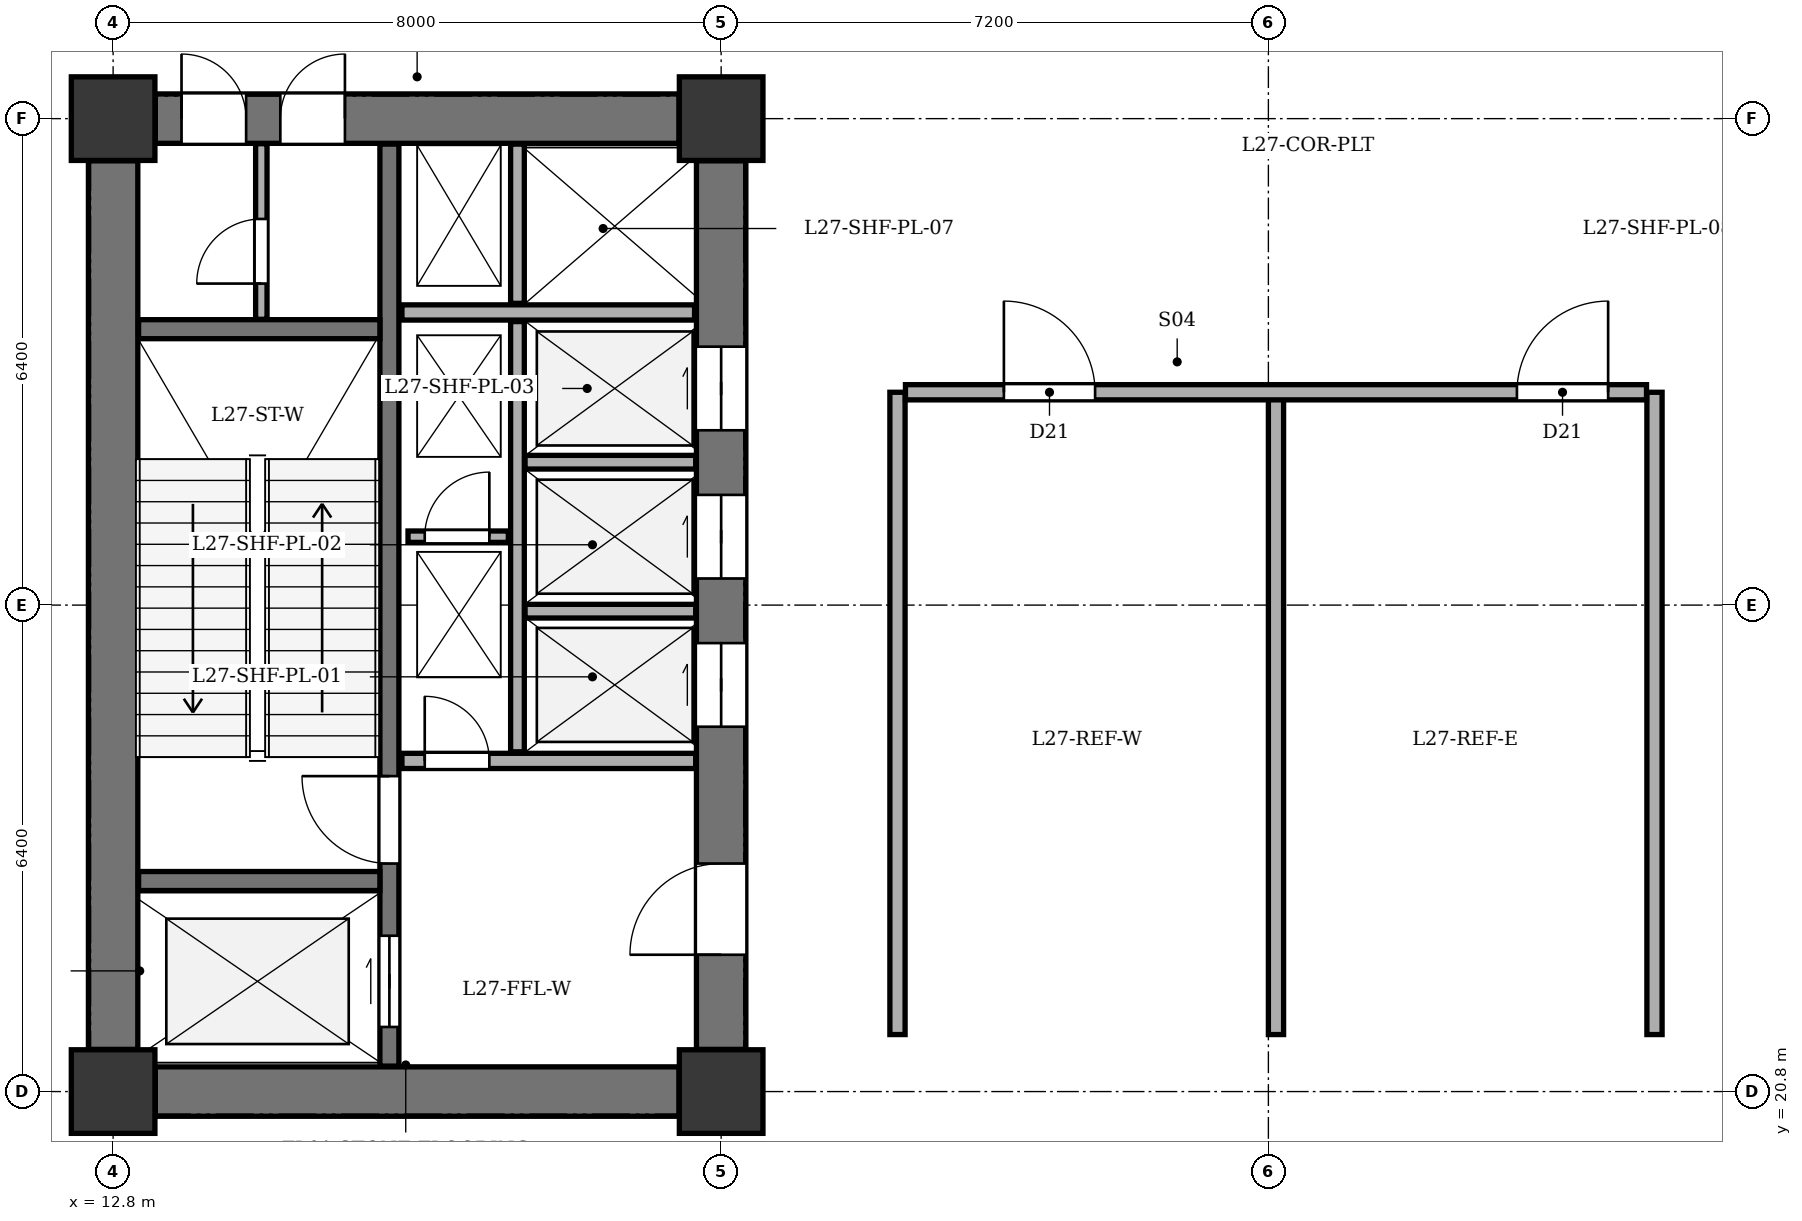
"""IFC4 building model, lengths in metres.
Left out: names, types, materials, properties, quantities, classifications, styles, units other than length and angle.
Written with IfcOpenShell. Run it as: python <this file> out.ifc"""

import sys

from ifc_helpers import new_model, si_unit, direction, frame, frame_2d, origin, origin_2d, place, context, subcontext, project, spatial, rectangle, extrude, element, fill, save


model = new_model("IFC4")
c1 = context("Model", 3, precision=1e-05, world=origin(), true_north=direction((0.0, 1.0)))
c2 = subcontext(c1, "Body", "Model", "MODEL_VIEW")
j1 = project(units=[si_unit("LENGTHUNIT", "METRE"), si_unit("PLANEANGLEUNIT", "RADIAN")], contexts=[c1])
p1 = place(None, origin())
s1 = spatial("IfcSite", under=j1, at=p1, CompositionType="ELEMENT")
p2 = place(p1, origin())
s2 = spatial("IfcBuilding", under=s1, at=p2, CompositionType="ELEMENT")
p3 = place(p2, frame((0.0, 0.0, 110.1)))
s3 = spatial("IfcBuildingStorey", under=s2, at=p3, CompositionType="ELEMENT", Elevation=110.1)
for number, where, z_axis, x_axis in (
    (1, (12.8, 20.8, 0.0), (0.0, 0.0, 1.0), (1.0, 0.0, 0.0)),
    (2, (20.8, 20.8, 0.0), (0.0, 0.0, 1.0), (1.0, 0.0, 0.0)),
    (3, (12.8, 33.6, 0.0), (0.0, 0.0, 1.0), (1.0, 0.0, 0.0)),
    (4, (20.8, 33.6, 0.0), (0.0, 0.0, 1.0), (1.0, 0.0, 0.0)),
):
    element("IfcColumn", number, at=place(p3, frame(where, z_axis=z_axis, x_axis=x_axis)), inside=s3, PredefinedType="COLUMN", context=c2, shape_type="SweptSolid", body=[
        extrude(rectangle(XDim=1.1, YDim=1.1, at=origin_2d()), origin(), (0.0, 0.0, 1.0), 5.4),
    ])
p4 = place(p3, frame((12.8, 21.355, 0.0), z_axis=(0.0, 0.0, 1.0), x_axis=(0.0, 1.0, 0.0)))
e5 = element("IfcWall", 5, at=p4, inside=s3, PredefinedType="SHEAR", context=c2, shape_type="SweptSolid", body=[
    extrude(rectangle(XDim=11.69, YDim=0.65, at=frame_2d((5.845, 0.0))), origin(), (0.0, 0.0, 1.0), 5.04),
])
p5 = place(p3, frame((13.355, 20.8, 0.0), z_axis=(0.0, 0.0, 1.0), x_axis=(1.0, 0.0, 0.0)))
e6 = element("IfcWall", 6, at=p5, inside=s3, PredefinedType="SHEAR", context=c2, shape_type="SweptSolid", body=[
    extrude(rectangle(XDim=6.89, YDim=0.65, at=frame_2d((3.445, 0.0))), origin(), (0.0, 0.0, 1.0), 5.04),
])
p6 = place(p3, frame((13.355, 33.6, 0.0), z_axis=(0.0, 0.0, 1.0), x_axis=(1.0, 0.0, 0.0)))
e7 = element("IfcWall", 7, at=p6, inside=s3, PredefinedType="SHEAR", context=c2, shape_type="SweptSolid", body=[
    extrude(rectangle(XDim=6.89, YDim=0.65, at=frame_2d((3.445, 0.0))), origin(), (0.0, 0.0, 1.0), 5.04),
])
p7 = place(p6, frame((0.345, 0.0, 0.0)))
e8 = element("IfcOpeningElement", 8, at=p7, cuts=e7, PredefinedType="OPENING", context=c2, shape_type="SweptSolid", body=[
    extrude(rectangle(XDim=0.85, YDim=2.02, at=frame_2d((0.425, 1.01))), frame((0.0, 0.335, 0.0), z_axis=(0.0, -1.0, 0.0), x_axis=(1.0, 0.0, 0.0)), (0.0, 0.0, 1.0), 0.67),
])
p8 = place(p6, frame((1.645, 0.0, 0.0)))
e9 = element("IfcOpeningElement", 9, at=p8, cuts=e7, PredefinedType="OPENING", context=c2, shape_type="SweptSolid", body=[
    extrude(rectangle(XDim=0.85, YDim=2.02, at=frame_2d((0.425, 1.01))), frame((0.0, 0.335, 0.0), z_axis=(0.0, -1.0, 0.0), x_axis=(1.0, 0.0, 0.0)), (0.0, 0.0, 1.0), 0.67),
])
p9 = place(p3, frame((20.8, 21.355, 0.0), z_axis=(0.0, 0.0, 1.0), x_axis=(0.0, 1.0, 0.0)))
e10 = element("IfcWall", 10, at=p9, inside=s3, PredefinedType="SHEAR", context=c2, shape_type="SweptSolid", body=[
    extrude(rectangle(XDim=11.69, YDim=0.65, at=frame_2d((5.845, 0.0))), origin(), (0.0, 0.0, 1.0), 5.04),
])
p10 = place(p9, frame((1.245, 0.0, 0.0)))
e11 = element("IfcOpeningElement", 11, at=p10, cuts=e10, PredefinedType="OPENING", context=c2, shape_type="SweptSolid", body=[
    extrude(rectangle(XDim=1.2, YDim=2.15, at=frame_2d((0.6, 1.075))), frame((0.0, 0.335, 0.0), z_axis=(0.0, -1.0, 0.0), x_axis=(1.0, 0.0, 0.0)), (0.0, 0.0, 1.0), 0.67),
])
p11 = place(p9, frame((4.245, 0.0, 0.0)))
e12 = element("IfcOpeningElement", 12, at=p11, cuts=e10, PredefinedType="OPENING", context=c2, shape_type="SweptSolid", body=[
    extrude(rectangle(XDim=1.1, YDim=2.1, at=frame_2d((0.55, 1.05))), frame((0.0, 0.335, 0.0), z_axis=(0.0, -1.0, 0.0), x_axis=(1.0, 0.0, 0.0)), (0.0, 0.0, 1.0), 0.67),
])
p12 = place(p9, frame((6.195, 0.0, 0.0)))
e13 = element("IfcOpeningElement", 13, at=p12, cuts=e10, PredefinedType="OPENING", context=c2, shape_type="SweptSolid", body=[
    extrude(rectangle(XDim=1.1, YDim=2.1, at=frame_2d((0.55, 1.05))), frame((0.0, 0.335, 0.0), z_axis=(0.0, -1.0, 0.0), x_axis=(1.0, 0.0, 0.0)), (0.0, 0.0, 1.0), 0.67),
])
p13 = place(p9, frame((8.145, 0.0, 0.0)))
e14 = element("IfcOpeningElement", 14, at=p13, cuts=e10, PredefinedType="OPENING", context=c2, shape_type="SweptSolid", body=[
    extrude(rectangle(XDim=1.1, YDim=2.1, at=frame_2d((0.55, 1.05))), frame((0.0, 0.335, 0.0), z_axis=(0.0, -1.0, 0.0), x_axis=(1.0, 0.0, 0.0)), (0.0, 0.0, 1.0), 0.67),
])
p14 = place(p3, frame((16.435, 21.135, 0.0), z_axis=(0.0, 0.0, 1.0), x_axis=(0.0, 1.0, 0.0)))
e15 = element("IfcWall", 15, at=p14, inside=s3, PredefinedType="SHEAR", context=c2, shape_type="SweptSolid", body=[
    extrude(rectangle(XDim=12.13, YDim=0.25, at=frame_2d((6.065, 0.0))), origin(), (0.0, 0.0, 1.0), 5.04),
])
p15 = place(p14, frame((0.515, 0.0, 0.0)))
e16 = element("IfcOpeningElement", 16, at=p15, cuts=e15, PredefinedType="OPENING", context=c2, shape_type="SweptSolid", body=[
    extrude(rectangle(XDim=1.2, YDim=2.15, at=frame_2d((0.6, 1.075))), frame((0.0, 0.135, 0.0), z_axis=(0.0, -1.0, 0.0), x_axis=(1.0, 0.0, 0.0)), (0.0, 0.0, 1.0), 0.27),
])
p16 = place(p14, frame((2.665, 0.0, 0.0)))
e17 = element("IfcOpeningElement", 17, at=p16, cuts=e15, PredefinedType="OPENING", context=c2, shape_type="SweptSolid", body=[
    extrude(rectangle(XDim=1.15, YDim=2.15, at=frame_2d((0.575, 1.075))), frame((0.0, 0.135, 0.0), z_axis=(0.0, -1.0, 0.0), x_axis=(1.0, 0.0, 0.0)), (0.0, 0.0, 1.0), 0.27),
])
for number, where, z_axis, x_axis in (
    (18, (13.135, 23.57, 0.0), (0.0, 0.0, 1.0), (1.0, 0.0, 0.0)),
    (19, (13.135, 30.83, 0.0), (0.0, 0.0, 1.0), (1.0, 0.0, 0.0)),
):
    element("IfcWall", number, at=place(p3, frame(where, z_axis=z_axis, x_axis=x_axis)), inside=s3, PredefinedType="SHEAR", context=c2, shape_type="SweptSolid", body=[
        extrude(rectangle(XDim=3.175, YDim=0.25, at=frame_2d((1.587, 0.0))), origin(), (0.0, 0.0, 1.0), 5.04),
    ])
p17 = place(p3, frame((16.6, 25.15, 0.0), z_axis=(0.0, 0.0, 1.0), x_axis=(1.0, 0.0, 0.0)))
e20 = element("IfcWall", 20, at=p17, inside=s3, PredefinedType="SOLIDWALL", context=c2, shape_type="SweptSolid", body=[
    extrude(rectangle(XDim=3.865, YDim=0.2, at=frame_2d((1.933, 0.0))), origin(), (0.0, 0.0, 1.0), 5.04),
])
p18 = place(p17, frame((0.3, 0.0, 0.0)))
e21 = element("IfcOpeningElement", 21, at=p18, cuts=e20, PredefinedType="OPENING", context=c2, shape_type="SweptSolid", body=[
    extrude(rectangle(XDim=0.85, YDim=2.02, at=frame_2d((0.425, 1.01))), frame((0.0, 0.11, 0.0), z_axis=(0.0, -1.0, 0.0), x_axis=(1.0, 0.0, 0.0)), (0.0, 0.0, 1.0), 0.22),
])
p19 = place(p3, frame((16.6, 31.05, 0.0), z_axis=(0.0, 0.0, 1.0), x_axis=(1.0, 0.0, 0.0)))
e22 = element("IfcWall", 22, at=p19, inside=s3, PredefinedType="SOLIDWALL", context=c2, shape_type="SweptSolid", body=[
    extrude(rectangle(XDim=3.85, YDim=0.2, at=frame_2d((1.925, 0.0))), origin(), (0.0, 0.0, 1.0), 5.04),
])
p20 = place(p3, frame((18.12, 25.27, 0.0), z_axis=(0.0, 0.0, 1.0), x_axis=(0.0, 1.0, 0.0)))
e23 = element("IfcWall", 23, at=p20, inside=s3, PredefinedType="PARTITIONING", context=c2, shape_type="SweptSolid", body=[
    extrude(rectangle(XDim=5.66, YDim=0.18, at=frame_2d((2.83, 0.0))), origin(), (0.0, 0.0, 1.0), 5.04),
])
p21 = place(p3, frame((18.12, 31.17, 0.0), z_axis=(0.0, 0.0, 1.0), x_axis=(0.0, 1.0, 0.0)))
e24 = element("IfcWall", 24, at=p21, inside=s3, PredefinedType="PARTITIONING", context=c2, shape_type="SweptSolid", body=[
    extrude(rectangle(XDim=2.095, YDim=0.18, at=frame_2d((1.047, 0.0))), origin(), (0.0, 0.0, 1.0), 5.04),
])
for number, where, z_axis, x_axis in (
    (25, (18.22, 27.12, 0.0), (0.0, 0.0, 1.0), (1.0, 0.0, 0.0)),
    (26, (18.22, 29.08, 0.0), (0.0, 0.0, 1.0), (1.0, 0.0, 0.0)),
):
    element("IfcWall", number, at=place(p3, frame(where, z_axis=z_axis, x_axis=x_axis)), inside=s3, PredefinedType="PARTITIONING", context=c2, shape_type="SweptSolid", body=[
        extrude(rectangle(XDim=2.245, YDim=0.18, at=frame_2d((1.123, 0.0))), origin(), (0.0, 0.0, 1.0), 5.04),
    ])
p22 = place(p3, frame((14.75, 30.96, 0.0), z_axis=(0.0, 0.0, 1.0), x_axis=(0.0, 1.0, 0.0)))
e27 = element("IfcWall", 27, at=p22, inside=s3, PredefinedType="PARTITIONING", context=c2, shape_type="SweptSolid", body=[
    extrude(rectangle(XDim=2.31, YDim=0.15, at=frame_2d((1.155, 0.0))), origin(), (0.0, 0.0, 1.0), 5.04),
])
p23 = place(p22, frame((0.47, 0.0, 0.0)))
e28 = element("IfcOpeningElement", 28, at=p23, cuts=e27, PredefinedType="OPENING", context=c2, shape_type="SweptSolid", body=[
    extrude(rectangle(XDim=0.85, YDim=2.02, at=frame_2d((0.425, 1.01))), frame((0.0, 0.085, 0.0), z_axis=(0.0, -1.0, 0.0), x_axis=(1.0, 0.0, 0.0)), (0.0, 0.0, 1.0), 0.17),
])
p24 = place(p3, frame((16.68, 28.1, 0.0), z_axis=(0.0, 0.0, 1.0), x_axis=(1.0, 0.0, 0.0)))
e29 = element("IfcWall", 29, at=p24, inside=s3, PredefinedType="PARTITIONING", context=c2, shape_type="SweptSolid", body=[
    extrude(rectangle(XDim=1.32, YDim=0.15, at=frame_2d((0.66, 0.0))), origin(), (0.0, 0.0, 1.0), 5.04),
])
p25 = place(p24, frame((0.22, 0.0, 0.0)))
e30 = element("IfcOpeningElement", 30, at=p25, cuts=e29, PredefinedType="OPENING", context=c2, shape_type="SweptSolid", body=[
    extrude(rectangle(XDim=0.85, YDim=2.02, at=frame_2d((0.425, 1.01))), frame((0.0, 0.085, 0.0), z_axis=(0.0, -1.0, 0.0), x_axis=(1.0, 0.0, 0.0)), (0.0, 0.0, 1.0), 0.17),
])
for number, where, z_axis, x_axis in (
    (31, (23.12, 21.55, 0.0), (0.0, 0.0, 1.0), (0.0, 1.0, 0.0)),
    (32, (33.08, 21.55, 0.0), (0.0, 0.0, 1.0), (0.0, 1.0, 0.0)),
):
    element("IfcWall", number, at=place(p3, frame(where, z_axis=z_axis, x_axis=x_axis)), inside=s3, PredefinedType="SOLIDWALL", context=c2, shape_type="SweptSolid", body=[
        extrude(rectangle(XDim=8.45, YDim=0.2, at=frame_2d((4.225, 0.0))), origin(), (0.0, 0.0, 1.0), 5.04),
    ])
p26 = place(p3, frame((28.1, 21.55, 0.0), z_axis=(0.0, 0.0, 1.0), x_axis=(0.0, 1.0, 0.0)))
e33 = element("IfcWall", 33, at=p26, inside=s3, PredefinedType="SOLIDWALL", context=c2, shape_type="SweptSolid", body=[
    extrude(rectangle(XDim=8.45, YDim=0.2, at=frame_2d((4.225, 0.0))), origin(), (0.0, 0.0, 1.0), 4.275),
])
p27 = place(p3, frame((23.225, 30.0, 0.0), z_axis=(0.0, 0.0, 1.0), x_axis=(1.0, 0.0, 0.0)))
e34 = element("IfcWall", 34, at=p27, inside=s3, PredefinedType="SOLIDWALL", context=c2, shape_type="SweptSolid", body=[
    extrude(rectangle(XDim=9.75, YDim=0.2, at=frame_2d((4.875, 0.0))), origin(), (0.0, 0.0, 1.0), 5.04),
])
p28 = place(p27, frame((1.295, 0.0, 0.0)))
e35 = element("IfcOpeningElement", 35, at=p28, cuts=e34, PredefinedType="OPENING", context=c2, shape_type="SweptSolid", body=[
    extrude(rectangle(XDim=1.2, YDim=2.15, at=frame_2d((0.6, 1.075))), frame((0.0, 0.11, 0.0), z_axis=(0.0, -1.0, 0.0), x_axis=(1.0, 0.0, 0.0)), (0.0, 0.0, 1.0), 0.22),
])
p29 = place(p27, frame((8.045, 0.0, 0.0)))
e36 = element("IfcOpeningElement", 36, at=p29, cuts=e34, PredefinedType="OPENING", context=c2, shape_type="SweptSolid", body=[
    extrude(rectangle(XDim=1.2, YDim=2.15, at=frame_2d((0.6, 1.075))), frame((0.0, 0.11, 0.0), z_axis=(0.0, -1.0, 0.0), x_axis=(1.0, 0.0, 0.0)), (0.0, 0.0, 1.0), 0.22),
])
p30 = place(p7, origin())
e37 = element("IfcDoor", 37, at=p30, inside=s3, OperationType="SINGLE_SWING_LEFT", PredefinedType="DOOR", context=c2, shape_type="SweptSolid", body=[
    extrude(rectangle(XDim=0.85, YDim=2.02, at=frame_2d((0.425, 1.01))), frame((0.0, 0.025, 0.0), z_axis=(0.0, -1.0, 0.0), x_axis=(1.0, 0.0, 0.0)), (0.0, 0.0, 1.0), 0.05),
])
fill(e8, e37)
p31 = place(p8, origin())
e38 = element("IfcDoor", 38, at=p31, inside=s3, OperationType="SINGLE_SWING_RIGHT", PredefinedType="DOOR", context=c2, shape_type="SweptSolid", body=[
    extrude(rectangle(XDim=0.85, YDim=2.02, at=frame_2d((0.425, 1.01))), frame((0.0, 0.025, 0.0), z_axis=(0.0, -1.0, 0.0), x_axis=(1.0, 0.0, 0.0)), (0.0, 0.0, 1.0), 0.05),
])
fill(e9, e38)
p32 = place(p10, origin())
e39 = element("IfcDoor", 39, at=p32, inside=s3, OperationType="SINGLE_SWING_LEFT", PredefinedType="DOOR", context=c2, shape_type="SweptSolid", body=[
    extrude(rectangle(XDim=1.2, YDim=2.15, at=frame_2d((0.6, 1.075))), frame((0.0, 0.025, 0.0), z_axis=(0.0, -1.0, 0.0), x_axis=(1.0, 0.0, 0.0)), (0.0, 0.0, 1.0), 0.05),
])
fill(e11, e39)
p33 = place(p11, origin())
e40 = element("IfcDoor", 40, at=p33, inside=s3, OperationType="DOUBLE_DOOR_SLIDING", PredefinedType="DOOR", context=c2, shape_type="SweptSolid", body=[
    extrude(rectangle(XDim=1.1, YDim=2.1, at=frame_2d((0.55, 1.05))), frame((0.0, 0.025, 0.0), z_axis=(0.0, -1.0, 0.0), x_axis=(1.0, 0.0, 0.0)), (0.0, 0.0, 1.0), 0.05),
])
fill(e12, e40)
p34 = place(p12, origin())
e41 = element("IfcDoor", 41, at=p34, inside=s3, OperationType="DOUBLE_DOOR_SLIDING", PredefinedType="DOOR", context=c2, shape_type="SweptSolid", body=[
    extrude(rectangle(XDim=1.1, YDim=2.1, at=frame_2d((0.55, 1.05))), frame((0.0, 0.025, 0.0), z_axis=(0.0, -1.0, 0.0), x_axis=(1.0, 0.0, 0.0)), (0.0, 0.0, 1.0), 0.05),
])
fill(e13, e41)
p35 = place(p13, origin())
e42 = element("IfcDoor", 42, at=p35, inside=s3, OperationType="DOUBLE_DOOR_SLIDING", PredefinedType="DOOR", context=c2, shape_type="SweptSolid", body=[
    extrude(rectangle(XDim=1.1, YDim=2.1, at=frame_2d((0.55, 1.05))), frame((0.0, 0.025, 0.0), z_axis=(0.0, -1.0, 0.0), x_axis=(1.0, 0.0, 0.0)), (0.0, 0.0, 1.0), 0.05),
])
fill(e14, e42)
p36 = place(p15, origin())
e43 = element("IfcDoor", 43, at=p36, inside=s3, OperationType="DOUBLE_DOOR_SLIDING", PredefinedType="DOOR", context=c2, shape_type="SweptSolid", body=[
    extrude(rectangle(XDim=1.2, YDim=2.15, at=frame_2d((0.6, 1.075))), frame((0.0, 0.025, 0.0), z_axis=(0.0, -1.0, 0.0), x_axis=(1.0, 0.0, 0.0)), (0.0, 0.0, 1.0), 0.05),
])
fill(e16, e43)
p37 = place(p16, origin())
e44 = element("IfcDoor", 44, at=p37, inside=s3, OperationType="SINGLE_SWING_RIGHT", PredefinedType="DOOR", context=c2, shape_type="SweptSolid", body=[
    extrude(rectangle(XDim=1.15, YDim=2.15, at=frame_2d((0.575, 1.075))), frame((0.0, 0.025, 0.0), z_axis=(0.0, -1.0, 0.0), x_axis=(1.0, 0.0, 0.0)), (0.0, 0.0, 1.0), 0.05),
])
fill(e17, e44)
p38 = place(p18, origin())
e45 = element("IfcDoor", 45, at=p38, inside=s3, OperationType="SINGLE_SWING_LEFT", PredefinedType="DOOR", context=c2, shape_type="SweptSolid", body=[
    extrude(rectangle(XDim=0.85, YDim=2.02, at=frame_2d((0.425, 1.01))), frame((0.0, 0.025, 0.0), z_axis=(0.0, -1.0, 0.0), x_axis=(1.0, 0.0, 0.0)), (0.0, 0.0, 1.0), 0.05),
])
fill(e21, e45)
p39 = place(p23, origin())
e46 = element("IfcDoor", 46, at=p39, inside=s3, OperationType="SINGLE_SWING_LEFT", PredefinedType="DOOR", context=c2, shape_type="SweptSolid", body=[
    extrude(rectangle(XDim=0.85, YDim=2.02, at=frame_2d((0.425, 1.01))), frame((0.0, 0.025, 0.0), z_axis=(0.0, -1.0, 0.0), x_axis=(1.0, 0.0, 0.0)), (0.0, 0.0, 1.0), 0.05),
])
fill(e28, e46)
p40 = place(p25, origin())
e47 = element("IfcDoor", 47, at=p40, inside=s3, OperationType="SINGLE_SWING_RIGHT", PredefinedType="DOOR", context=c2, shape_type="SweptSolid", body=[
    extrude(rectangle(XDim=0.85, YDim=2.02, at=frame_2d((0.425, 1.01))), frame((0.0, 0.025, 0.0), z_axis=(0.0, -1.0, 0.0), x_axis=(1.0, 0.0, 0.0)), (0.0, 0.0, 1.0), 0.05),
])
fill(e30, e47)
p41 = place(p28, origin())
e48 = element("IfcDoor", 48, at=p41, inside=s3, OperationType="SINGLE_SWING_LEFT", PredefinedType="DOOR", context=c2, shape_type="SweptSolid", body=[
    extrude(rectangle(XDim=1.2, YDim=2.15, at=frame_2d((0.6, 1.075))), frame((0.0, 0.025, 0.0), z_axis=(0.0, -1.0, 0.0), x_axis=(1.0, 0.0, 0.0)), (0.0, 0.0, 1.0), 0.05),
])
fill(e35, e48)
p42 = place(p29, origin())
e49 = element("IfcDoor", 49, at=p42, inside=s3, OperationType="SINGLE_SWING_RIGHT", PredefinedType="DOOR", context=c2, shape_type="SweptSolid", body=[
    extrude(rectangle(XDim=1.2, YDim=2.15, at=frame_2d((0.6, 1.075))), frame((0.0, 0.025, 0.0), z_axis=(0.0, -1.0, 0.0), x_axis=(1.0, 0.0, 0.0)), (0.0, 0.0, 1.0), 0.05),
])
fill(e36, e49)
save(model, sys.argv[1])
